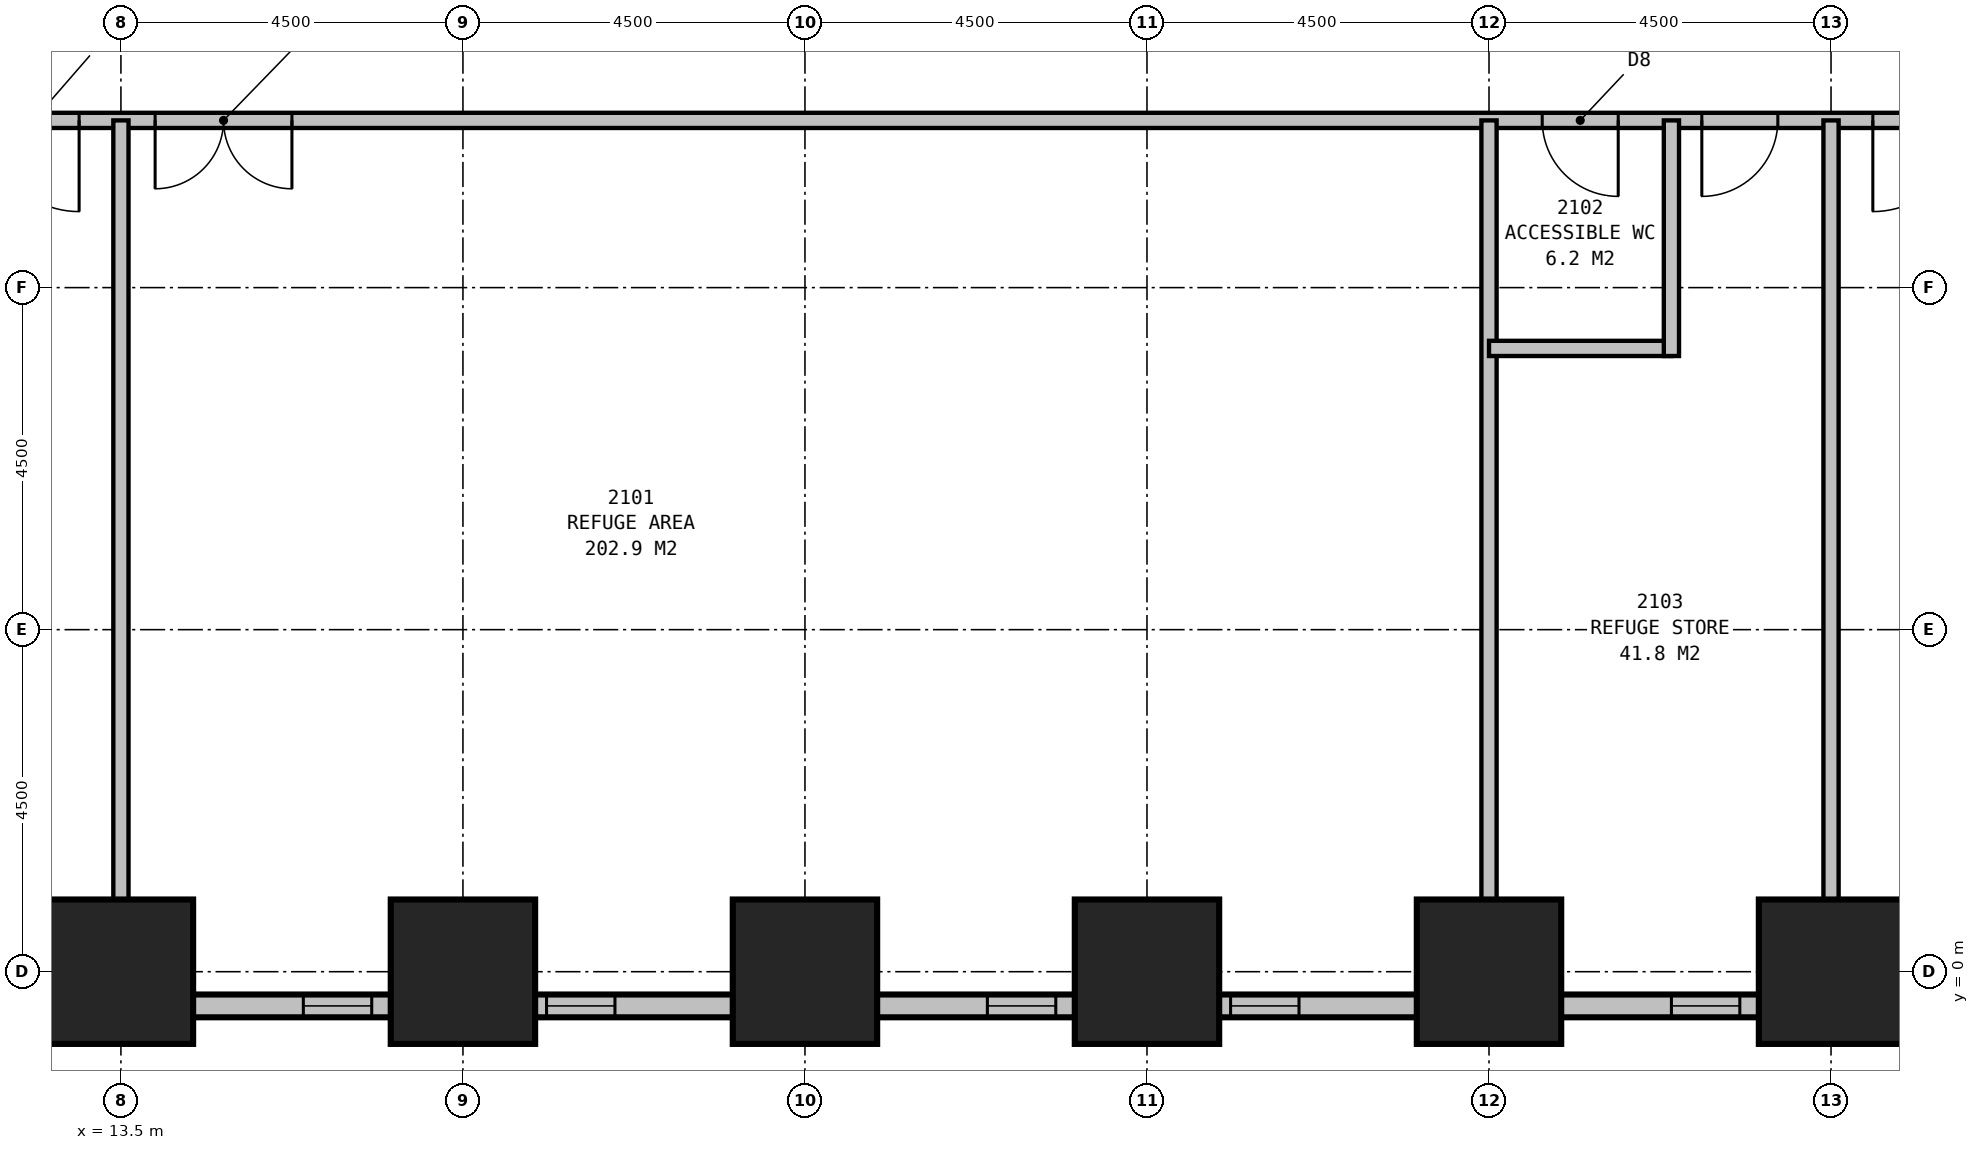
"""IFC4 building model, lengths in metres.
Left out: names, types, materials, properties, quantities, classifications, styles, units other than length and angle.
Written with IfcOpenShell. Run it as: python <this file> out.ifc"""

import sys

from ifc_helpers import new_model, si_unit, direction, frame, frame_2d, origin, origin_2d, place, context, subcontext, project, spatial, rectangle, extrude, element, fill, save


model = new_model("IFC4")
c1 = context("Model", 3, precision=1e-05, world=origin(), true_north=direction((0.0, 1.0)))
c2 = subcontext(c1, "Body", "Model", "MODEL_VIEW")
j1 = project(units=[si_unit("LENGTHUNIT", "METRE"), si_unit("PLANEANGLEUNIT", "RADIAN")], contexts=[c1])
p1 = place(None, origin())
s1 = spatial("IfcSite", under=j1, at=p1, CompositionType="ELEMENT")
p2 = place(p1, origin())
s2 = spatial("IfcBuilding", under=s1, at=p2, CompositionType="ELEMENT")
p3 = place(p2, frame((0.0, 0.0, 85.7)))
s3 = spatial("IfcBuildingStorey", under=s2, at=p3, CompositionType="ELEMENT", Elevation=85.7)
for number, where, z_axis, x_axis in (
    (1, (13.5, 0.0, 0.0), (0.0, 0.0, 1.0), (1.0, 0.0, 0.0)),
    (2, (18.0, 0.0, 0.0), (0.0, 0.0, 1.0), (1.0, 0.0, 0.0)),
    (3, (22.5, 0.0, 0.0), (0.0, 0.0, 1.0), (1.0, 0.0, 0.0)),
    (4, (27.0, 0.0, 0.0), (0.0, 0.0, 1.0), (1.0, 0.0, 0.0)),
    (5, (31.5, 0.0, 0.0), (0.0, 0.0, 1.0), (1.0, 0.0, 0.0)),
    (6, (36.0, 0.0, 0.0), (0.0, 0.0, 1.0), (1.0, 0.0, 0.0)),
):
    element("IfcColumn", number, at=place(p3, frame(where, z_axis=z_axis, x_axis=x_axis)), inside=s3, PredefinedType="COLUMN", context=c2, shape_type="SweptSolid", body=[
        extrude(rectangle(XDim=1.9, YDim=1.9, at=origin_2d()), origin(), (0.0, 0.0, 1.0), 4.2),
    ])
p4 = place(p3, frame((3.9, -0.45, 0.0), z_axis=(0.0, 0.0, 1.0), x_axis=(1.0, 0.0, 0.0)))
e7 = element("IfcWall", 7, at=p4, inside=s3, PredefinedType="STANDARD", context=c2, shape_type="SweptSolid", body=[
    extrude(rectangle(XDim=41.7, YDim=0.3, at=frame_2d((20.85, 0.0))), origin(), (0.0, 0.0, 1.0), 2.85),
])
p5 = place(p4, frame((3.0, 0.0, 0.5)))
e8 = element("IfcOpeningElement", 8, at=p5, cuts=e7, PredefinedType="OPENING", context=c2, shape_type="SweptSolid", body=[
    extrude(rectangle(XDim=0.9, YDim=1.2, at=frame_2d((0.45, 0.6))), frame((0.0, 0.16, 0.0), z_axis=(0.0, -1.0, 0.0), x_axis=(1.0, 0.0, 0.0)), (0.0, 0.0, 1.0), 0.32),
])
p6 = place(p4, frame((6.2, 0.0, 0.5)))
e9 = element("IfcOpeningElement", 9, at=p6, cuts=e7, PredefinedType="OPENING", context=c2, shape_type="SweptSolid", body=[
    extrude(rectangle(XDim=0.9, YDim=1.2, at=frame_2d((0.45, 0.6))), frame((0.0, 0.16, 0.0), z_axis=(0.0, -1.0, 0.0), x_axis=(1.0, 0.0, 0.0)), (0.0, 0.0, 1.0), 0.32),
])
p7 = place(p4, frame((12.0, 0.0, 0.5)))
e10 = element("IfcOpeningElement", 10, at=p7, cuts=e7, PredefinedType="OPENING", context=c2, shape_type="SweptSolid", body=[
    extrude(rectangle(XDim=0.9, YDim=1.2, at=frame_2d((0.45, 0.6))), frame((0.0, 0.16, 0.0), z_axis=(0.0, -1.0, 0.0), x_axis=(1.0, 0.0, 0.0)), (0.0, 0.0, 1.0), 0.32),
])
p8 = place(p4, frame((15.2, 0.0, 0.5)))
e11 = element("IfcOpeningElement", 11, at=p8, cuts=e7, PredefinedType="OPENING", context=c2, shape_type="SweptSolid", body=[
    extrude(rectangle(XDim=0.9, YDim=1.2, at=frame_2d((0.45, 0.6))), frame((0.0, 0.16, 0.0), z_axis=(0.0, -1.0, 0.0), x_axis=(1.0, 0.0, 0.0)), (0.0, 0.0, 1.0), 0.32),
])
p9 = place(p4, frame((21.0, 0.0, 0.5)))
e12 = element("IfcOpeningElement", 12, at=p9, cuts=e7, PredefinedType="OPENING", context=c2, shape_type="SweptSolid", body=[
    extrude(rectangle(XDim=0.9, YDim=1.2, at=frame_2d((0.45, 0.6))), frame((0.0, 0.16, 0.0), z_axis=(0.0, -1.0, 0.0), x_axis=(1.0, 0.0, 0.0)), (0.0, 0.0, 1.0), 0.32),
])
p10 = place(p4, frame((24.2, 0.0, 0.5)))
e13 = element("IfcOpeningElement", 13, at=p10, cuts=e7, PredefinedType="OPENING", context=c2, shape_type="SweptSolid", body=[
    extrude(rectangle(XDim=0.9, YDim=1.2, at=frame_2d((0.45, 0.6))), frame((0.0, 0.16, 0.0), z_axis=(0.0, -1.0, 0.0), x_axis=(1.0, 0.0, 0.0)), (0.0, 0.0, 1.0), 0.32),
])
p11 = place(p4, frame((30.0, 0.0, 0.5)))
e14 = element("IfcOpeningElement", 14, at=p11, cuts=e7, PredefinedType="OPENING", context=c2, shape_type="SweptSolid", body=[
    extrude(rectangle(XDim=0.9, YDim=1.2, at=frame_2d((0.45, 0.6))), frame((0.0, 0.16, 0.0), z_axis=(0.0, -1.0, 0.0), x_axis=(1.0, 0.0, 0.0)), (0.0, 0.0, 1.0), 0.32),
])
p12 = place(p4, frame((33.2, 0.0, 0.5)))
e15 = element("IfcOpeningElement", 15, at=p12, cuts=e7, PredefinedType="OPENING", context=c2, shape_type="SweptSolid", body=[
    extrude(rectangle(XDim=0.9, YDim=1.2, at=frame_2d((0.45, 0.6))), frame((0.0, 0.16, 0.0), z_axis=(0.0, -1.0, 0.0), x_axis=(1.0, 0.0, 0.0)), (0.0, 0.0, 1.0), 0.32),
])
p13 = place(p4, frame((39.0, 0.0, 0.5)))
e16 = element("IfcOpeningElement", 16, at=p13, cuts=e7, PredefinedType="OPENING", context=c2, shape_type="SweptSolid", body=[
    extrude(rectangle(XDim=0.9, YDim=1.2, at=frame_2d((0.45, 0.6))), frame((0.0, 0.16, 0.0), z_axis=(0.0, -1.0, 0.0), x_axis=(1.0, 0.0, 0.0)), (0.0, 0.0, 1.0), 0.32),
])
p14 = place(p3, frame((11.2, 11.2, 0.0), z_axis=(0.0, 0.0, 1.0), x_axis=(1.0, 0.0, 0.0)))
e17 = element("IfcWall", 17, at=p14, inside=s3, PredefinedType="PARTITIONING", context=c2, shape_type="SweptSolid", body=[
    extrude(rectangle(XDim=27.1, YDim=0.2, at=frame_2d((13.55, 0.0))), origin(), (0.0, 0.0, 1.0), 3.95),
])
p15 = place(p14, frame((4.55, 0.0, 0.0), z_axis=(0.0, 0.0, 1.0), x_axis=(-1.0, 0.0, 0.0)))
e18 = element("IfcOpeningElement", 18, at=p15, cuts=e17, PredefinedType="OPENING", context=c2, shape_type="SweptSolid", body=[
    extrude(rectangle(XDim=1.8, YDim=2.4, at=frame_2d((0.9, 1.2))), frame((0.0, 0.11, 0.0), z_axis=(0.0, -1.0, 0.0), x_axis=(1.0, 0.0, 0.0)), (0.0, 0.0, 1.0), 0.22),
])
p16 = place(p14, frame((22.0, 0.0, 0.0), z_axis=(0.0, 0.0, 1.0), x_axis=(-1.0, 0.0, 0.0)))
e19 = element("IfcOpeningElement", 19, at=p16, cuts=e17, PredefinedType="OPENING", context=c2, shape_type="SweptSolid", body=[
    extrude(rectangle(XDim=1.0, YDim=2.1, at=frame_2d((0.5, 1.05))), frame((0.0, 0.11, 0.0), z_axis=(0.0, -1.0, 0.0), x_axis=(1.0, 0.0, 0.0)), (0.0, 0.0, 1.0), 0.22),
])
p17 = place(p14, frame((24.1, 0.0, 0.0), z_axis=(0.0, 0.0, 1.0), x_axis=(-1.0, 0.0, 0.0)))
e20 = element("IfcOpeningElement", 20, at=p17, cuts=e17, PredefinedType="OPENING", context=c2, shape_type="SweptSolid", body=[
    extrude(rectangle(XDim=1.0, YDim=2.1, at=frame_2d((0.5, 1.05))), frame((0.0, 0.11, 0.0), z_axis=(0.0, -1.0, 0.0), x_axis=(1.0, 0.0, 0.0)), (0.0, 0.0, 1.0), 0.22),
])
p18 = place(p14, frame((1.75, 0.0, 0.0), z_axis=(0.0, 0.0, 1.0), x_axis=(-1.0, 0.0, 0.0)))
e21 = element("IfcOpeningElement", 21, at=p18, cuts=e17, PredefinedType="OPENING", context=c2, shape_type="SweptSolid", body=[
    extrude(rectangle(XDim=1.2, YDim=2.1, at=frame_2d((0.6, 1.05))), frame((0.0, 0.11, 0.0), z_axis=(0.0, -1.0, 0.0), x_axis=(1.0, 0.0, 0.0)), (0.0, 0.0, 1.0), 0.22),
])
p19 = place(p14, frame((26.55, 0.0, 0.0), z_axis=(0.0, 0.0, 1.0), x_axis=(-1.0, 0.0, 0.0)))
e22 = element("IfcOpeningElement", 22, at=p19, cuts=e17, PredefinedType="OPENING", context=c2, shape_type="SweptSolid", body=[
    extrude(rectangle(XDim=1.2, YDim=2.1, at=frame_2d((0.6, 1.05))), frame((0.0, 0.11, 0.0), z_axis=(0.0, -1.0, 0.0), x_axis=(1.0, 0.0, 0.0)), (0.0, 0.0, 1.0), 0.22),
])
for number, where, z_axis, x_axis in (
    (23, (13.5, 11.2, 0.0), (0.0, 0.0, 1.0), (0.0, -1.0, 0.0)),
    (24, (31.5, 11.2, 0.0), (0.0, 0.0, 1.0), (0.0, -1.0, 0.0)),
    (25, (36.0, 11.2, 0.0), (0.0, 0.0, 1.0), (0.0, -1.0, 0.0)),
):
    element("IfcWall", number, at=place(p3, frame(where, z_axis=z_axis, x_axis=x_axis)), inside=s3, PredefinedType="PARTITIONING", context=c2, shape_type="SweptSolid", body=[
        extrude(rectangle(XDim=10.25, YDim=0.2, at=frame_2d((5.125, 0.0))), origin(), (0.0, 0.0, 1.0), 2.95),
    ])
p20 = place(p3, frame((33.9, 11.2, 0.0), z_axis=(0.0, 0.0, 1.0), x_axis=(0.0, -1.0, 0.0)))
e26 = element("IfcWall", 26, at=p20, inside=s3, PredefinedType="PARTITIONING", context=c2, shape_type="SweptSolid", body=[
    extrude(rectangle(XDim=3.1, YDim=0.2, at=frame_2d((1.55, 0.0))), origin(), (0.0, 0.0, 1.0), 3.95),
])
p21 = place(p3, frame((31.5, 8.2, 0.0), z_axis=(0.0, 0.0, 1.0), x_axis=(1.0, 0.0, 0.0)))
e27 = element("IfcWall", 27, at=p21, inside=s3, PredefinedType="PARTITIONING", context=c2, shape_type="SweptSolid", body=[
    extrude(rectangle(XDim=2.4, YDim=0.2, at=frame_2d((1.2, 0.0))), origin(), (0.0, 0.0, 1.0), 3.95),
])
p22 = place(p7, origin())
e28 = element("IfcWindow", 28, at=p22, inside=s3, PartitioningType="SINGLE_PANEL", PredefinedType="USERDEFINED", context=c2, shape_type="SweptSolid", body=[
    extrude(rectangle(XDim=0.9, YDim=1.2, at=frame_2d((0.45, 0.6))), frame((0.0, 0.03, 0.0), z_axis=(0.0, -1.0, 0.0), x_axis=(1.0, 0.0, 0.0)), (0.0, 0.0, 1.0), 0.06),
])
fill(e10, e28)
p23 = place(p8, origin())
e29 = element("IfcWindow", 29, at=p23, inside=s3, PartitioningType="SINGLE_PANEL", PredefinedType="USERDEFINED", context=c2, shape_type="SweptSolid", body=[
    extrude(rectangle(XDim=0.9, YDim=1.2, at=frame_2d((0.45, 0.6))), frame((0.0, 0.03, 0.0), z_axis=(0.0, -1.0, 0.0), x_axis=(1.0, 0.0, 0.0)), (0.0, 0.0, 1.0), 0.06),
])
fill(e11, e29)
p24 = place(p9, origin())
e30 = element("IfcWindow", 30, at=p24, inside=s3, PartitioningType="SINGLE_PANEL", PredefinedType="USERDEFINED", context=c2, shape_type="SweptSolid", body=[
    extrude(rectangle(XDim=0.9, YDim=1.2, at=frame_2d((0.45, 0.6))), frame((0.0, 0.03, 0.0), z_axis=(0.0, -1.0, 0.0), x_axis=(1.0, 0.0, 0.0)), (0.0, 0.0, 1.0), 0.06),
])
fill(e12, e30)
p25 = place(p10, origin())
e31 = element("IfcWindow", 31, at=p25, inside=s3, PartitioningType="SINGLE_PANEL", PredefinedType="USERDEFINED", context=c2, shape_type="SweptSolid", body=[
    extrude(rectangle(XDim=0.9, YDim=1.2, at=frame_2d((0.45, 0.6))), frame((0.0, 0.03, 0.0), z_axis=(0.0, -1.0, 0.0), x_axis=(1.0, 0.0, 0.0)), (0.0, 0.0, 1.0), 0.06),
])
fill(e13, e31)
p26 = place(p11, origin())
e32 = element("IfcWindow", 32, at=p26, inside=s3, PartitioningType="SINGLE_PANEL", PredefinedType="USERDEFINED", context=c2, shape_type="SweptSolid", body=[
    extrude(rectangle(XDim=0.9, YDim=1.2, at=frame_2d((0.45, 0.6))), frame((0.0, 0.03, 0.0), z_axis=(0.0, -1.0, 0.0), x_axis=(1.0, 0.0, 0.0)), (0.0, 0.0, 1.0), 0.06),
])
fill(e14, e32)
p27 = place(p15, origin())
e33 = element("IfcDoor", 33, at=p27, inside=s3, OperationType="DOUBLE_DOOR_SINGLE_SWING", PredefinedType="DOOR", context=c2, shape_type="SweptSolid", body=[
    extrude(rectangle(XDim=1.8, YDim=2.4, at=frame_2d((0.9, 1.2))), frame((0.0, 0.025, 0.0), z_axis=(0.0, -1.0, 0.0), x_axis=(1.0, 0.0, 0.0)), (0.0, 0.0, 1.0), 0.05),
])
fill(e18, e33)
p28 = place(p16, origin())
e34 = element("IfcDoor", 34, at=p28, inside=s3, OperationType="SINGLE_SWING_LEFT", PredefinedType="DOOR", context=c2, shape_type="SweptSolid", body=[
    extrude(rectangle(XDim=1.0, YDim=2.1, at=frame_2d((0.5, 1.05))), frame((0.0, 0.025, 0.0), z_axis=(0.0, -1.0, 0.0), x_axis=(1.0, 0.0, 0.0)), (0.0, 0.0, 1.0), 0.05),
])
fill(e19, e34)
p29 = place(p17, origin())
e35 = element("IfcDoor", 35, at=p29, inside=s3, OperationType="SINGLE_SWING_RIGHT", PredefinedType="DOOR", context=c2, shape_type="SweptSolid", body=[
    extrude(rectangle(XDim=1.0, YDim=2.1, at=frame_2d((0.5, 1.05))), frame((0.0, 0.025, 0.0), z_axis=(0.0, -1.0, 0.0), x_axis=(1.0, 0.0, 0.0)), (0.0, 0.0, 1.0), 0.05),
])
fill(e20, e35)
p30 = place(p18, origin())
e36 = element("IfcDoor", 36, at=p30, inside=s3, OperationType="SINGLE_SWING_LEFT", PredefinedType="DOOR", context=c2, shape_type="SweptSolid", body=[
    extrude(rectangle(XDim=1.2, YDim=2.1, at=frame_2d((0.6, 1.05))), frame((0.0, 0.025, 0.0), z_axis=(0.0, -1.0, 0.0), x_axis=(1.0, 0.0, 0.0)), (0.0, 0.0, 1.0), 0.05),
])
fill(e21, e36)
p31 = place(p19, origin())
e37 = element("IfcDoor", 37, at=p31, inside=s3, OperationType="SINGLE_SWING_RIGHT", PredefinedType="DOOR", context=c2, shape_type="SweptSolid", body=[
    extrude(rectangle(XDim=1.2, YDim=2.1, at=frame_2d((0.6, 1.05))), frame((0.0, 0.025, 0.0), z_axis=(0.0, -1.0, 0.0), x_axis=(1.0, 0.0, 0.0)), (0.0, 0.0, 1.0), 0.05),
])
fill(e22, e37)
save(model, sys.argv[1])
